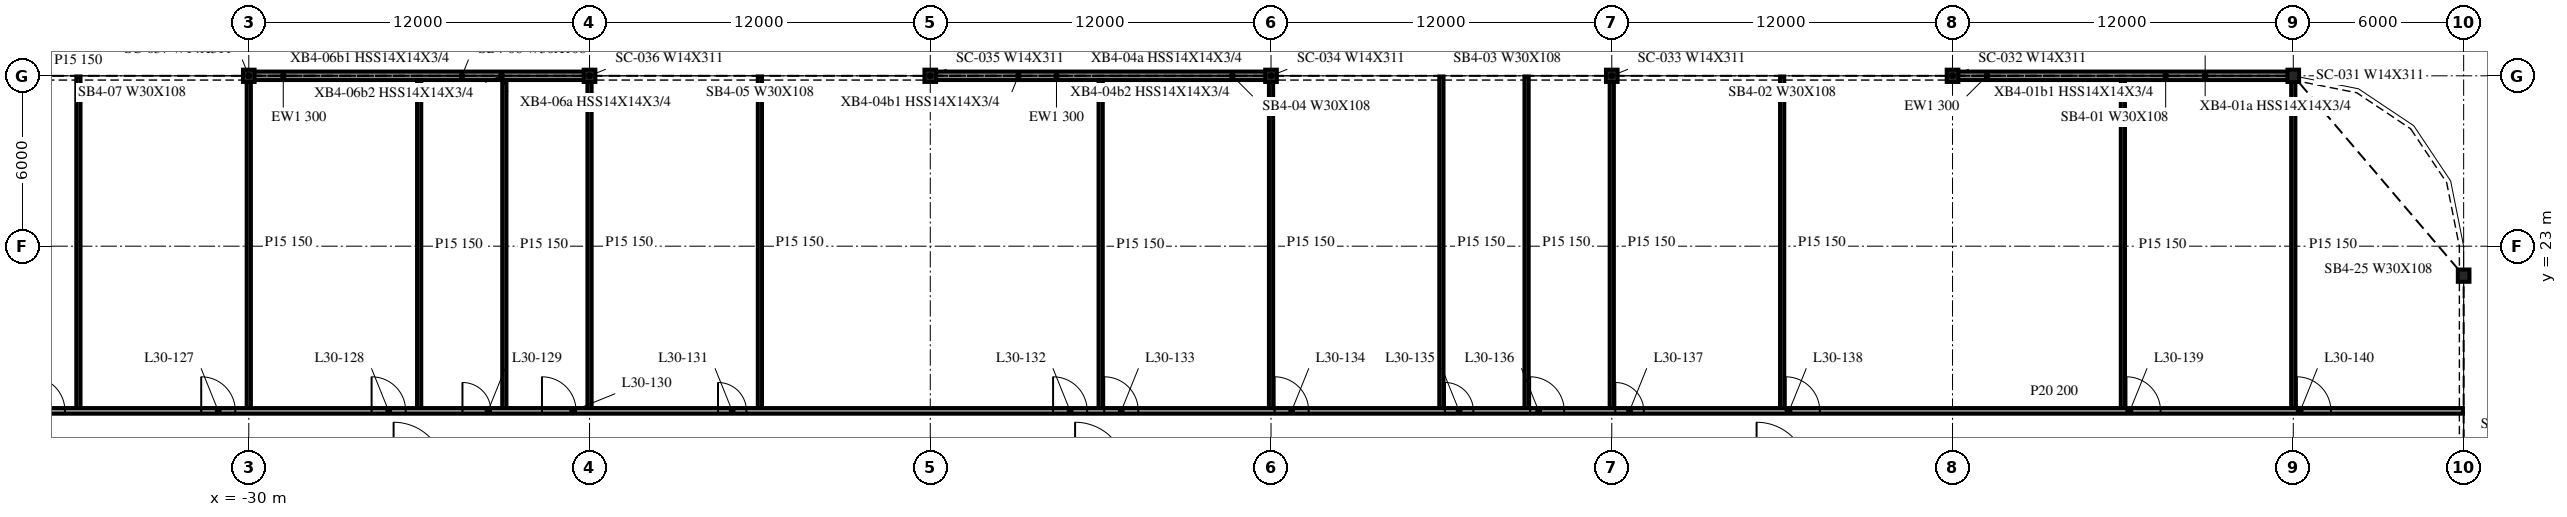
"""IFC4 building model, lengths in metres.
Left out: names, types, materials, properties, quantities, classifications, styles, units other than length and angle.
Written with IfcOpenShell. Run it as: python <this file> out.ifc"""

import sys

from ifc_helpers import new_model, si_unit, direction, frame, frame_2d, origin, origin_2d, place, context, subcontext, project, spatial, rectangle, i_section, extrude, element, fill, save


model = new_model("IFC4")
c1 = context("Model", 3, precision=1e-05, world=origin(), true_north=direction((0.0, 1.0)))
c2 = subcontext(c1, "Body", "Model", "MODEL_VIEW")
j1 = project(units=[si_unit("LENGTHUNIT", "METRE"), si_unit("PLANEANGLEUNIT", "RADIAN")], contexts=[c1])
p1 = place(None, origin())
s1 = spatial("IfcSite", under=j1, at=p1, CompositionType="ELEMENT")
p2 = place(p1, origin())
s2 = spatial("IfcBuilding", under=s1, at=p2, CompositionType="ELEMENT")
p3 = place(p2, frame((0.0, 0.0, 130.2)))
s3 = spatial("IfcBuildingStorey", under=s2, at=p3, CompositionType="ELEMENT", Elevation=130.2)
for number, where, z_axis, x_axis in (
    (1, (42.0, 29.0, -0.34), (0.0, 0.0, 1.0), (1.0, 0.0, 0.0)),
    (2, (30.0, 29.0, -0.34), (0.0, 0.0, 1.0), (1.0, 0.0, 0.0)),
    (3, (18.0, 29.0, -0.34), (0.0, 0.0, 1.0), (1.0, 0.0, 0.0)),
    (4, (6.0, 29.0, -0.34), (0.0, 0.0, 1.0), (1.0, 0.0, 0.0)),
    (5, (-6.0, 29.0, -0.34), (0.0, 0.0, 1.0), (1.0, 0.0, 0.0)),
    (6, (-18.0, 29.0, -0.34), (0.0, 0.0, 1.0), (1.0, 0.0, 0.0)),
    (7, (-30.0, 29.0, -0.34), (0.0, 0.0, 1.0), (1.0, 0.0, 0.0)),
    (8, (48.0, 21.962, -0.34), (0.0, 0.0, 1.0), (1.0, 0.0, 0.0)),
):
    element("IfcColumn", number, at=place(p3, frame(where, z_axis=z_axis, x_axis=x_axis)), inside=s3, PredefinedType="COLUMN", context=c2, shape_type="SweptSolid", body=[
        extrude(i_section(OverallWidth=0.412, OverallDepth=0.434, WebThickness=0.036, FlangeThickness=0.057, at=origin_2d()), origin(), (0.0, 0.0, 1.0), 4.1),
    ])
for number, where, z_axis, x_axis in (
    (9, (41.982, 29.0, 0.0), (0.0, 0.0, 1.0), (-1.0, 0.0, 0.0)),
    (10, (5.982, 29.0, 0.0), (0.0, 0.0, 1.0), (-1.0, 0.0, 0.0)),
    (11, (-18.018, 29.0, 0.0), (0.0, 0.0, 1.0), (-1.0, 0.0, 0.0)),
):
    element("IfcWall", number, at=place(p3, frame(where, z_axis=z_axis, x_axis=x_axis)), inside=s3, PredefinedType="NOTDEFINED", context=c2, shape_type="SweptSolid", body=[
        extrude(rectangle(XDim=11.964, YDim=0.3, at=frame_2d((5.982, 0.0))), origin(), (0.0, 0.0, 1.0), 3.003),
    ])
p4 = place(p3, frame((-47.975, 17.2, 0.0), z_axis=(0.0, 0.0, 1.0), x_axis=(1.0, 0.0, 0.0)))
e12 = element("IfcWall", 12, at=p4, inside=s3, PredefinedType="PARTITIONING", context=c2, shape_type="SweptSolid", body=[
    extrude(rectangle(XDim=95.95, YDim=0.2, at=frame_2d((47.975, 0.0))), origin(), (0.0, 0.0, 1.0), 3.76),
])
p5 = place(p4, frame((10.3, 0.0, 0.0)))
e13 = element("IfcOpeningElement", 13, at=p5, cuts=e12, PredefinedType="OPENING", context=c2, shape_type="SweptSolid", body=[
    extrude(rectangle(XDim=1.2, YDim=2.1, at=frame_2d((0.6, 1.05))), frame((0.0, 0.11, 0.0), z_axis=(0.0, -1.0, 0.0), x_axis=(1.0, 0.0, 0.0)), (0.0, 0.0, 1.0), 0.22),
])
p6 = place(p4, frame((16.3, 0.0, 0.0)))
e14 = element("IfcOpeningElement", 14, at=p6, cuts=e12, PredefinedType="OPENING", context=c2, shape_type="SweptSolid", body=[
    extrude(rectangle(XDim=1.2, YDim=2.1, at=frame_2d((0.6, 1.05))), frame((0.0, 0.11, 0.0), z_axis=(0.0, -1.0, 0.0), x_axis=(1.0, 0.0, 0.0)), (0.0, 0.0, 1.0), 0.22),
])
p7 = place(p4, frame((22.3, 0.0, 0.0)))
e15 = element("IfcOpeningElement", 15, at=p7, cuts=e12, PredefinedType="OPENING", context=c2, shape_type="SweptSolid", body=[
    extrude(rectangle(XDim=1.2, YDim=2.1, at=frame_2d((0.6, 1.05))), frame((0.0, 0.11, 0.0), z_axis=(0.0, -1.0, 0.0), x_axis=(1.0, 0.0, 0.0)), (0.0, 0.0, 1.0), 0.22),
])
p8 = place(p4, frame((25.5, 0.0, 0.0)))
e16 = element("IfcOpeningElement", 16, at=p8, cuts=e12, PredefinedType="OPENING", context=c2, shape_type="SweptSolid", body=[
    extrude(rectangle(XDim=1.0, YDim=2.1, at=frame_2d((0.5, 1.05))), frame((0.0, 0.11, 0.0), z_axis=(0.0, -1.0, 0.0), x_axis=(1.0, 0.0, 0.0)), (0.0, 0.0, 1.0), 0.22),
])
p9 = place(p4, frame((28.3, 0.0, 0.0)))
e17 = element("IfcOpeningElement", 17, at=p9, cuts=e12, PredefinedType="OPENING", context=c2, shape_type="SweptSolid", body=[
    extrude(rectangle(XDim=1.2, YDim=2.1, at=frame_2d((0.6, 1.05))), frame((0.0, 0.11, 0.0), z_axis=(0.0, -1.0, 0.0), x_axis=(1.0, 0.0, 0.0)), (0.0, 0.0, 1.0), 0.22),
])
p10 = place(p4, frame((34.5, 0.0, 0.0)))
e18 = element("IfcOpeningElement", 18, at=p10, cuts=e12, PredefinedType="OPENING", context=c2, shape_type="SweptSolid", body=[
    extrude(rectangle(XDim=1.0, YDim=2.1, at=frame_2d((0.5, 1.05))), frame((0.0, 0.11, 0.0), z_axis=(0.0, -1.0, 0.0), x_axis=(1.0, 0.0, 0.0)), (0.0, 0.0, 1.0), 0.22),
])
p11 = place(p4, frame((46.3, 0.0, 0.0)))
e19 = element("IfcOpeningElement", 19, at=p11, cuts=e12, PredefinedType="OPENING", context=c2, shape_type="SweptSolid", body=[
    extrude(rectangle(XDim=1.2, YDim=2.1, at=frame_2d((0.6, 1.05))), frame((0.0, 0.11, 0.0), z_axis=(0.0, -1.0, 0.0), x_axis=(1.0, 0.0, 0.0)), (0.0, 0.0, 1.0), 0.22),
])
p12 = place(p4, frame((48.1, 0.0, 0.0)))
e20 = element("IfcOpeningElement", 20, at=p12, cuts=e12, PredefinedType="OPENING", context=c2, shape_type="SweptSolid", body=[
    extrude(rectangle(XDim=1.2, YDim=2.1, at=frame_2d((0.6, 1.05))), frame((0.0, 0.11, 0.0), z_axis=(0.0, -1.0, 0.0), x_axis=(1.0, 0.0, 0.0)), (0.0, 0.0, 1.0), 0.22),
])
p13 = place(p4, frame((54.1, 0.0, 0.0)))
e21 = element("IfcOpeningElement", 21, at=p13, cuts=e12, PredefinedType="OPENING", context=c2, shape_type="SweptSolid", body=[
    extrude(rectangle(XDim=1.2, YDim=2.1, at=frame_2d((0.6, 1.05))), frame((0.0, 0.11, 0.0), z_axis=(0.0, -1.0, 0.0), x_axis=(1.0, 0.0, 0.0)), (0.0, 0.0, 1.0), 0.22),
])
p14 = place(p4, frame((60.1, 0.0, 0.0)))
e22 = element("IfcOpeningElement", 22, at=p14, cuts=e12, PredefinedType="OPENING", context=c2, shape_type="SweptSolid", body=[
    extrude(rectangle(XDim=1.0, YDim=2.1, at=frame_2d((0.5, 1.05))), frame((0.0, 0.11, 0.0), z_axis=(0.0, -1.0, 0.0), x_axis=(1.0, 0.0, 0.0)), (0.0, 0.0, 1.0), 0.22),
])
p15 = place(p4, frame((63.1, 0.0, 0.0)))
e23 = element("IfcOpeningElement", 23, at=p15, cuts=e12, PredefinedType="OPENING", context=c2, shape_type="SweptSolid", body=[
    extrude(rectangle(XDim=1.2, YDim=2.1, at=frame_2d((0.6, 1.05))), frame((0.0, 0.11, 0.0), z_axis=(0.0, -1.0, 0.0), x_axis=(1.0, 0.0, 0.0)), (0.0, 0.0, 1.0), 0.22),
])
p16 = place(p4, frame((66.1, 0.0, 0.0)))
e24 = element("IfcOpeningElement", 24, at=p16, cuts=e12, PredefinedType="OPENING", context=c2, shape_type="SweptSolid", body=[
    extrude(rectangle(XDim=1.0, YDim=2.1, at=frame_2d((0.5, 1.05))), frame((0.0, 0.11, 0.0), z_axis=(0.0, -1.0, 0.0), x_axis=(1.0, 0.0, 0.0)), (0.0, 0.0, 1.0), 0.22),
])
p17 = place(p4, frame((72.1, 0.0, 0.0)))
e25 = element("IfcOpeningElement", 25, at=p17, cuts=e12, PredefinedType="OPENING", context=c2, shape_type="SweptSolid", body=[
    extrude(rectangle(XDim=1.2, YDim=2.1, at=frame_2d((0.6, 1.05))), frame((0.0, 0.11, 0.0), z_axis=(0.0, -1.0, 0.0), x_axis=(1.0, 0.0, 0.0)), (0.0, 0.0, 1.0), 0.22),
])
p18 = place(p4, frame((84.1, 0.0, 0.0)))
e26 = element("IfcOpeningElement", 26, at=p18, cuts=e12, PredefinedType="OPENING", context=c2, shape_type="SweptSolid", body=[
    extrude(rectangle(XDim=1.2, YDim=2.1, at=frame_2d((0.6, 1.05))), frame((0.0, 0.11, 0.0), z_axis=(0.0, -1.0, 0.0), x_axis=(1.0, 0.0, 0.0)), (0.0, 0.0, 1.0), 0.22),
])
p19 = place(p4, frame((90.1, 0.0, 0.0)))
e27 = element("IfcOpeningElement", 27, at=p19, cuts=e12, PredefinedType="OPENING", context=c2, shape_type="SweptSolid", body=[
    extrude(rectangle(XDim=1.2, YDim=2.1, at=frame_2d((0.6, 1.05))), frame((0.0, 0.11, 0.0), z_axis=(0.0, -1.0, 0.0), x_axis=(1.0, 0.0, 0.0)), (0.0, 0.0, 1.0), 0.22),
])
for number, where, z_axis, x_axis in (
    (28, (-36.0, 17.3, 0.0), (0.0, 0.0, 1.0), (0.0, 1.0, 0.0)),
    (29, (-30.0, 17.3, 0.0), (0.0, 0.0, 1.0), (0.0, 1.0, 0.0)),
):
    element("IfcWall", number, at=place(p3, frame(where, z_axis=z_axis, x_axis=x_axis)), inside=s3, PredefinedType="PARTITIONING", context=c2, shape_type="SweptSolid", body=[
        extrude(rectangle(XDim=11.675, YDim=0.15, at=frame_2d((5.837, 0.0))), origin(), (0.0, 0.0, 1.0), 3.76),
    ])
for number, where, z_axis, x_axis in (
    (30, (-24.0, 17.3, 0.0), (0.0, 0.0, 1.0), (0.0, 1.0, 0.0)),
    (31, (-21.0, 17.3, 0.0), (0.0, 0.0, 1.0), (0.0, 1.0, 0.0)),
):
    element("IfcWall", number, at=place(p3, frame(where, z_axis=z_axis, x_axis=x_axis)), inside=s3, PredefinedType="PARTITIONING", context=c2, shape_type="SweptSolid", body=[
        extrude(rectangle(XDim=11.55, YDim=0.15, at=frame_2d((5.775, 0.0))), origin(), (0.0, 0.0, 1.0), 3.76),
    ])
for number, where, z_axis, x_axis in (
    (32, (-18.0, 17.3, 0.0), (0.0, 0.0, 1.0), (0.0, 1.0, 0.0)),
    (33, (-12.0, 17.3, 0.0), (0.0, 0.0, 1.0), (0.0, 1.0, 0.0)),
):
    element("IfcWall", number, at=place(p3, frame(where, z_axis=z_axis, x_axis=x_axis)), inside=s3, PredefinedType="PARTITIONING", context=c2, shape_type="SweptSolid", body=[
        extrude(rectangle(XDim=11.675, YDim=0.15, at=frame_2d((5.837, 0.0))), origin(), (0.0, 0.0, 1.0), 3.76),
    ])
p20 = place(p3, frame((0.0, 17.3, 0.0), z_axis=(0.0, 0.0, 1.0), x_axis=(0.0, 1.0, 0.0)))
e34 = element("IfcWall", 34, at=p20, inside=s3, PredefinedType="PARTITIONING", context=c2, shape_type="SweptSolid", body=[
    extrude(rectangle(XDim=11.55, YDim=0.15, at=frame_2d((5.775, 0.0))), origin(), (0.0, 0.0, 1.0), 3.76),
])
for number, where, z_axis, x_axis in (
    (35, (6.0, 17.3, 0.0), (0.0, 0.0, 1.0), (0.0, 1.0, 0.0)),
    (36, (12.0, 17.3, 0.0), (0.0, 0.0, 1.0), (0.0, 1.0, 0.0)),
    (37, (15.0, 17.3, 0.0), (0.0, 0.0, 1.0), (0.0, 1.0, 0.0)),
    (38, (18.0, 17.3, 0.0), (0.0, 0.0, 1.0), (0.0, 1.0, 0.0)),
    (39, (24.0, 17.3, 0.0), (0.0, 0.0, 1.0), (0.0, 1.0, 0.0)),
):
    element("IfcWall", number, at=place(p3, frame(where, z_axis=z_axis, x_axis=x_axis)), inside=s3, PredefinedType="PARTITIONING", context=c2, shape_type="SweptSolid", body=[
        extrude(rectangle(XDim=11.675, YDim=0.15, at=frame_2d((5.837, 0.0))), origin(), (0.0, 0.0, 1.0), 3.76),
    ])
p21 = place(p3, frame((36.0, 17.3, 0.0), z_axis=(0.0, 0.0, 1.0), x_axis=(0.0, 1.0, 0.0)))
e40 = element("IfcWall", 40, at=p21, inside=s3, PredefinedType="PARTITIONING", context=c2, shape_type="SweptSolid", body=[
    extrude(rectangle(XDim=11.55, YDim=0.15, at=frame_2d((5.775, 0.0))), origin(), (0.0, 0.0, 1.0), 3.76),
])
p22 = place(p3, frame((42.0, 17.3, 0.0), z_axis=(0.0, 0.0, 1.0), x_axis=(0.0, 1.0, 0.0)))
e41 = element("IfcWall", 41, at=p22, inside=s3, PredefinedType="PARTITIONING", context=c2, shape_type="SweptSolid", body=[
    extrude(rectangle(XDim=11.547, YDim=0.15, at=frame_2d((5.773, 0.0))), origin(), (0.0, 0.0, 1.0), 3.76),
])
p23 = place(p5, origin())
e42 = element("IfcDoor", 42, at=p23, inside=s3, OperationType="SINGLE_SWING_LEFT", PredefinedType="DOOR", context=c2, shape_type="SweptSolid", body=[
    extrude(rectangle(XDim=1.2, YDim=2.1, at=frame_2d((0.6, 1.05))), frame((0.0, 0.025, 0.0), z_axis=(0.0, -1.0, 0.0), x_axis=(1.0, 0.0, 0.0)), (0.0, 0.0, 1.0), 0.05),
])
fill(e13, e42)
p24 = place(p6, origin())
e43 = element("IfcDoor", 43, at=p24, inside=s3, OperationType="SINGLE_SWING_LEFT", PredefinedType="DOOR", context=c2, shape_type="SweptSolid", body=[
    extrude(rectangle(XDim=1.2, YDim=2.1, at=frame_2d((0.6, 1.05))), frame((0.0, 0.025, 0.0), z_axis=(0.0, -1.0, 0.0), x_axis=(1.0, 0.0, 0.0)), (0.0, 0.0, 1.0), 0.05),
])
fill(e14, e43)
p25 = place(p7, origin())
e44 = element("IfcDoor", 44, at=p25, inside=s3, OperationType="SINGLE_SWING_LEFT", PredefinedType="DOOR", context=c2, shape_type="SweptSolid", body=[
    extrude(rectangle(XDim=1.2, YDim=2.1, at=frame_2d((0.6, 1.05))), frame((0.0, 0.025, 0.0), z_axis=(0.0, -1.0, 0.0), x_axis=(1.0, 0.0, 0.0)), (0.0, 0.0, 1.0), 0.05),
])
fill(e15, e44)
p26 = place(p8, origin())
e45 = element("IfcDoor", 45, at=p26, inside=s3, OperationType="SINGLE_SWING_LEFT", PredefinedType="DOOR", context=c2, shape_type="SweptSolid", body=[
    extrude(rectangle(XDim=1.0, YDim=2.1, at=frame_2d((0.5, 1.05))), frame((0.0, 0.025, 0.0), z_axis=(0.0, -1.0, 0.0), x_axis=(1.0, 0.0, 0.0)), (0.0, 0.0, 1.0), 0.05),
])
fill(e16, e45)
p27 = place(p9, origin())
e46 = element("IfcDoor", 46, at=p27, inside=s3, OperationType="SINGLE_SWING_LEFT", PredefinedType="DOOR", context=c2, shape_type="SweptSolid", body=[
    extrude(rectangle(XDim=1.2, YDim=2.1, at=frame_2d((0.6, 1.05))), frame((0.0, 0.025, 0.0), z_axis=(0.0, -1.0, 0.0), x_axis=(1.0, 0.0, 0.0)), (0.0, 0.0, 1.0), 0.05),
])
fill(e17, e46)
p28 = place(p10, origin())
e47 = element("IfcDoor", 47, at=p28, inside=s3, OperationType="SINGLE_SWING_LEFT", PredefinedType="DOOR", context=c2, shape_type="SweptSolid", body=[
    extrude(rectangle(XDim=1.0, YDim=2.1, at=frame_2d((0.5, 1.05))), frame((0.0, 0.025, 0.0), z_axis=(0.0, -1.0, 0.0), x_axis=(1.0, 0.0, 0.0)), (0.0, 0.0, 1.0), 0.05),
])
fill(e18, e47)
p29 = place(p11, origin())
e48 = element("IfcDoor", 48, at=p29, inside=s3, OperationType="SINGLE_SWING_LEFT", PredefinedType="DOOR", context=c2, shape_type="SweptSolid", body=[
    extrude(rectangle(XDim=1.2, YDim=2.1, at=frame_2d((0.6, 1.05))), frame((0.0, 0.025, 0.0), z_axis=(0.0, -1.0, 0.0), x_axis=(1.0, 0.0, 0.0)), (0.0, 0.0, 1.0), 0.05),
])
fill(e19, e48)
p30 = place(p12, origin())
e49 = element("IfcDoor", 49, at=p30, inside=s3, OperationType="SINGLE_SWING_RIGHT", PredefinedType="DOOR", context=c2, shape_type="SweptSolid", body=[
    extrude(rectangle(XDim=1.2, YDim=2.1, at=frame_2d((0.6, 1.05))), frame((0.0, 0.025, 0.0), z_axis=(0.0, -1.0, 0.0), x_axis=(1.0, 0.0, 0.0)), (0.0, 0.0, 1.0), 0.05),
])
fill(e20, e49)
p31 = place(p13, origin())
e50 = element("IfcDoor", 50, at=p31, inside=s3, OperationType="SINGLE_SWING_RIGHT", PredefinedType="DOOR", context=c2, shape_type="SweptSolid", body=[
    extrude(rectangle(XDim=1.2, YDim=2.1, at=frame_2d((0.6, 1.05))), frame((0.0, 0.025, 0.0), z_axis=(0.0, -1.0, 0.0), x_axis=(1.0, 0.0, 0.0)), (0.0, 0.0, 1.0), 0.05),
])
fill(e21, e50)
p32 = place(p14, origin())
e51 = element("IfcDoor", 51, at=p32, inside=s3, OperationType="SINGLE_SWING_RIGHT", PredefinedType="DOOR", context=c2, shape_type="SweptSolid", body=[
    extrude(rectangle(XDim=1.0, YDim=2.1, at=frame_2d((0.5, 1.05))), frame((0.0, 0.025, 0.0), z_axis=(0.0, -1.0, 0.0), x_axis=(1.0, 0.0, 0.0)), (0.0, 0.0, 1.0), 0.05),
])
fill(e22, e51)
p33 = place(p15, origin())
e52 = element("IfcDoor", 52, at=p33, inside=s3, OperationType="SINGLE_SWING_RIGHT", PredefinedType="DOOR", context=c2, shape_type="SweptSolid", body=[
    extrude(rectangle(XDim=1.2, YDim=2.1, at=frame_2d((0.6, 1.05))), frame((0.0, 0.025, 0.0), z_axis=(0.0, -1.0, 0.0), x_axis=(1.0, 0.0, 0.0)), (0.0, 0.0, 1.0), 0.05),
])
fill(e23, e52)
p34 = place(p16, origin())
e53 = element("IfcDoor", 53, at=p34, inside=s3, OperationType="SINGLE_SWING_RIGHT", PredefinedType="DOOR", context=c2, shape_type="SweptSolid", body=[
    extrude(rectangle(XDim=1.0, YDim=2.1, at=frame_2d((0.5, 1.05))), frame((0.0, 0.025, 0.0), z_axis=(0.0, -1.0, 0.0), x_axis=(1.0, 0.0, 0.0)), (0.0, 0.0, 1.0), 0.05),
])
fill(e24, e53)
p35 = place(p17, origin())
e54 = element("IfcDoor", 54, at=p35, inside=s3, OperationType="SINGLE_SWING_RIGHT", PredefinedType="DOOR", context=c2, shape_type="SweptSolid", body=[
    extrude(rectangle(XDim=1.2, YDim=2.1, at=frame_2d((0.6, 1.05))), frame((0.0, 0.025, 0.0), z_axis=(0.0, -1.0, 0.0), x_axis=(1.0, 0.0, 0.0)), (0.0, 0.0, 1.0), 0.05),
])
fill(e25, e54)
p36 = place(p18, origin())
e55 = element("IfcDoor", 55, at=p36, inside=s3, OperationType="SINGLE_SWING_RIGHT", PredefinedType="DOOR", context=c2, shape_type="SweptSolid", body=[
    extrude(rectangle(XDim=1.2, YDim=2.1, at=frame_2d((0.6, 1.05))), frame((0.0, 0.025, 0.0), z_axis=(0.0, -1.0, 0.0), x_axis=(1.0, 0.0, 0.0)), (0.0, 0.0, 1.0), 0.05),
])
fill(e26, e55)
p37 = place(p19, origin())
e56 = element("IfcDoor", 56, at=p37, inside=s3, OperationType="SINGLE_SWING_RIGHT", PredefinedType="DOOR", context=c2, shape_type="SweptSolid", body=[
    extrude(rectangle(XDim=1.2, YDim=2.1, at=frame_2d((0.6, 1.05))), frame((0.0, 0.025, 0.0), z_axis=(0.0, -1.0, 0.0), x_axis=(1.0, 0.0, 0.0)), (0.0, 0.0, 1.0), 0.05),
])
fill(e27, e56)
save(model, sys.argv[1])
